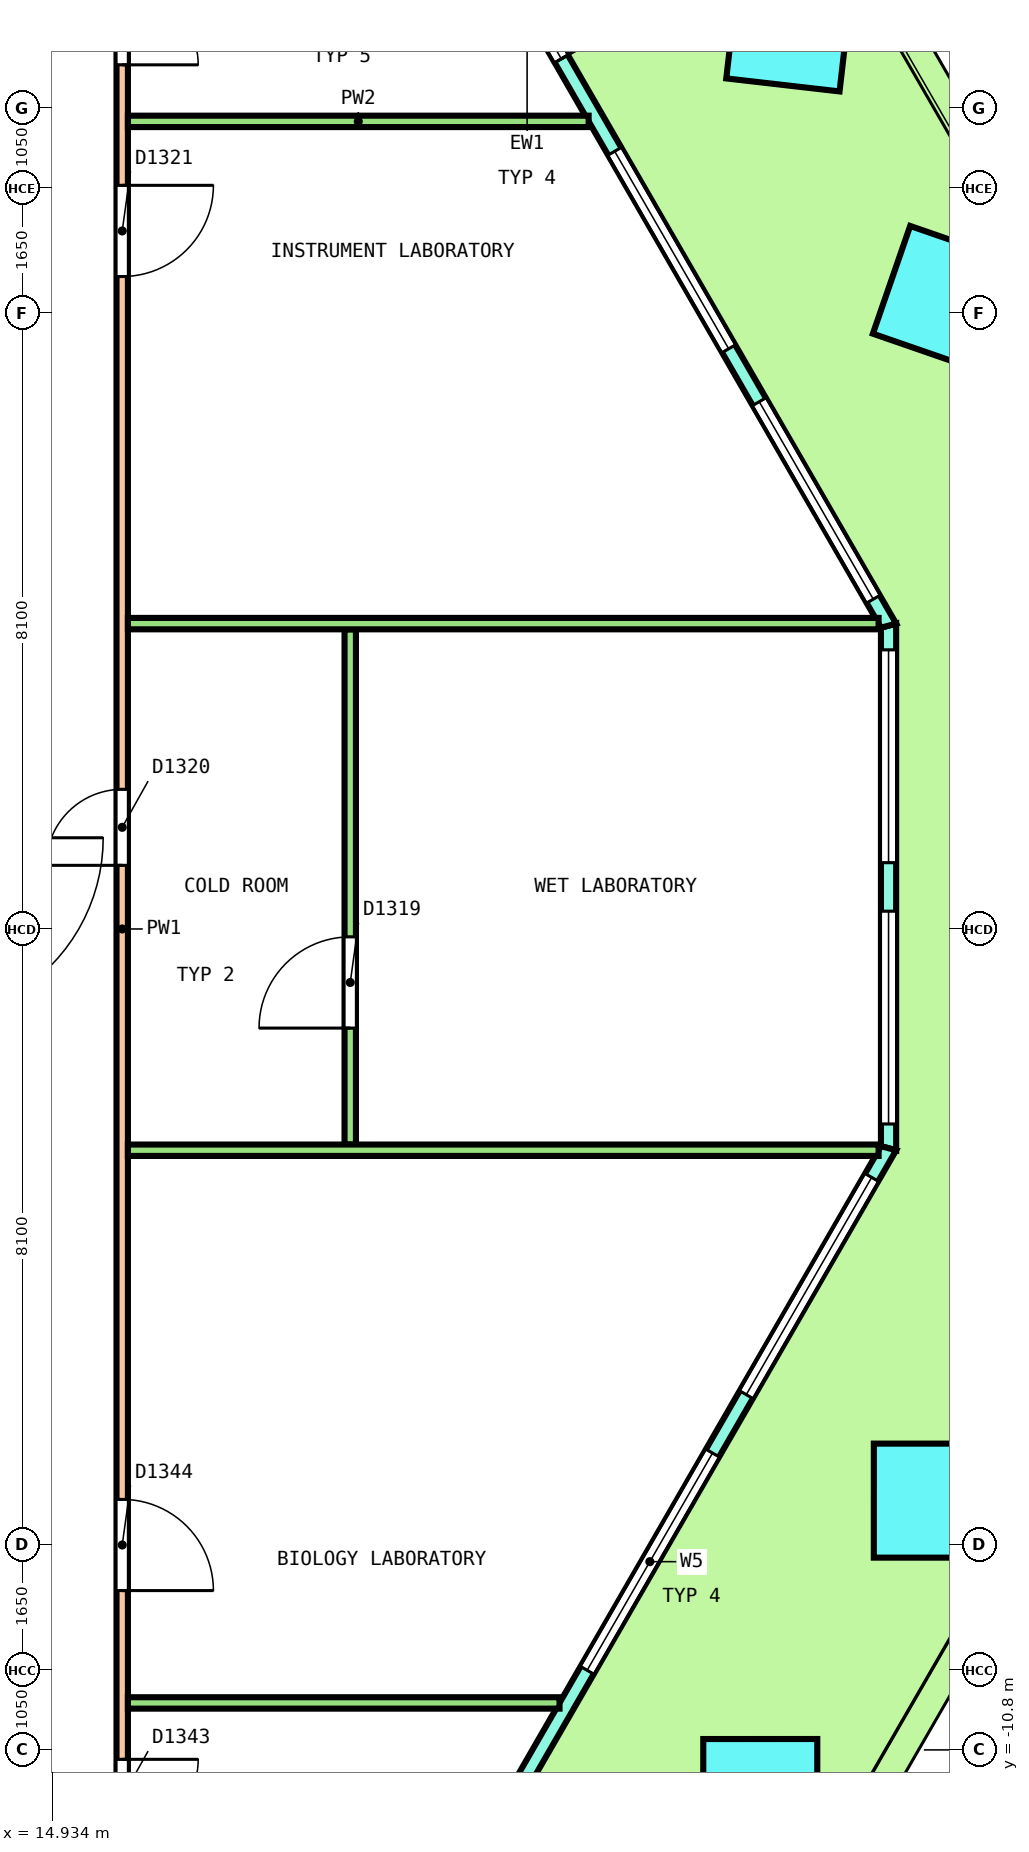
"""IFC4 building model, lengths in metres.
Left out: names, types, materials, properties, quantities, classifications, styles, units other than length and angle.
Written with IfcOpenShell. Run it as: python <this file> out.ifc"""

import sys

from ifc_helpers import new_model, si_unit, direction, frame, frame_2d, origin, origin_2d, place, context, subcontext, project, spatial, polyline, rectangle, outline, extrude, element, fill, save


model = new_model("IFC4")
c1 = context("Model", 3, precision=1e-05, world=origin(), true_north=direction((0.0, 1.0)))
c2 = subcontext(c1, "Body", "Model", "MODEL_VIEW")
j1 = project(units=[si_unit("LENGTHUNIT", "METRE"), si_unit("PLANEANGLEUNIT", "RADIAN")], contexts=[c1])
p1 = place(None, origin())
s1 = spatial("IfcSite", under=j1, at=p1, CompositionType="ELEMENT")
p2 = place(p1, origin())
s2 = spatial("IfcBuilding", under=s1, at=p2, CompositionType="ELEMENT")
p3 = place(p2, frame((0.0, 0.0, 32.2)))
s3 = spatial("IfcBuildingStorey", under=s2, at=p3, CompositionType="ELEMENT", Elevation=32.2)
p4 = place(p3, frame((26.68, 8.295, 0.0), z_axis=(0.021809609218, 0.025123223878, 0.999446429063), x_axis=(-0.499316957517, 0.86635106376, -0.010881647777)))
e1 = element("IfcColumn", 1, at=p4, inside=s3, PredefinedType="COLUMN", context=c2, shape_type="SweptSolid", body=[
    extrude(rectangle(XDim=1.5, YDim=1.5, at=origin_2d()), origin(), (0.0, 0.0, 1.0), 4.052),
])
p5 = place(p3, frame((24.628, 11.849, 0.0), z_axis=(0.025365582388, 0.018858497119, 0.999500347332), x_axis=(-0.501191337303, 0.865328971352, -0.0036075963)))
e2 = element("IfcColumn", 2, at=p5, inside=s3, PredefinedType="COLUMN", context=c2, shape_type="SweptSolid", body=[
    extrude(rectangle(XDim=1.5, YDim=1.5, at=origin_2d()), origin(), (0.0, 0.0, 1.0), 4.052),
])
p6 = place(p3, frame((24.245, -11.407, 0.0), z_axis=(0.003677036938, 0.006329325876, 0.999973209158), x_axis=(0.502147149997, 0.864751212075, -0.007319901948)))
e3 = element("IfcColumn", 3, at=p6, inside=s3, PredefinedType="COLUMN", context=c2, shape_type="SweptSolid", body=[
    extrude(rectangle(XDim=1.5, YDim=1.5, at=origin_2d()), origin(), (0.0, 0.0, 1.0), 4.05),
])
p7 = place(p3, frame((26.488, -7.521, 0.0), z_axis=(0.010908253887, 0.018863444567, 0.99976256204), x_axis=(0.500638377412, 0.865382225109, -0.021790354016)))
e4 = element("IfcColumn", 4, at=p7, inside=s3, PredefinedType="COLUMN", context=c2, shape_type="SweptSolid", body=[
    extrude(rectangle(XDim=1.5, YDim=1.5, at=origin_2d()), origin(), (0.0, 0.0, 1.0), 4.051),
])
p8 = place(p3, frame((25.932, -2.884, 0.0), z_axis=(0.0, 0.0, 1.0), x_axis=(0.0, 1.0, 0.0)))
e5 = element("IfcWall", 5, at=p8, inside=s3, PredefinedType="SOLIDWALL", context=c2, shape_type="SweptSolid", body=[
    extrude(outline(polyline([(-0.027, -0.1), (1.128, -0.1), (2.283, -0.1), (3.438, -0.1), (4.592, -0.1), (5.747, -0.1), (6.902, -0.1), (6.848, 0.1), (5.711, 0.1), (4.574, 0.1), (3.438, 0.1), (2.301, 0.1), (1.164, 0.1), (0.027, 0.1), (-0.027, -0.1)])), origin(), (0.0, 0.0, 1.0), 4.1),
])
p9 = place(p8, frame((0.319, 0.0, 0.1)))
e6 = element("IfcOpeningElement", 6, at=p9, cuts=e5, PredefinedType="OPENING", context=c2, shape_type="SweptSolid", body=[
    extrude(rectangle(XDim=2.8, YDim=2.9, at=frame_2d((1.4, 1.45))), frame((0.0, 0.11, 0.0), z_axis=(0.0, -1.0, 0.0), x_axis=(1.0, 0.0, 0.0)), (0.0, 0.0, 1.0), 0.22),
])
p10 = place(p8, frame((3.756, 0.0, 0.1)))
e7 = element("IfcOpeningElement", 7, at=p10, cuts=e5, PredefinedType="OPENING", context=c2, shape_type="SweptSolid", body=[
    extrude(rectangle(XDim=2.8, YDim=2.9, at=frame_2d((1.4, 1.45))), frame((0.0, 0.11, 0.0), z_axis=(0.0, -1.0, 0.0), x_axis=(1.0, 0.0, 0.0)), (0.0, 0.0, 1.0), 0.22),
])
p11 = place(p3, frame((25.932, 3.99, 0.0), z_axis=(0.0, 0.0, 1.0), x_axis=(-0.500001707189, 0.866024418136, 0.0)))
e8 = element("IfcWall", 8, at=p11, inside=s3, PredefinedType="SOLIDWALL", context=c2, shape_type="SweptSolid", body=[
    extrude(outline(polyline([(-0.027, -0.1), (0.977, -0.1), (1.981, -0.1), (2.985, -0.1), (3.989, -0.1), (4.993, -0.1), (5.997, -0.1), (7.0, -0.1), (8.004, -0.1), (9.008, -0.1), (10.012, -0.1), (11.016, -0.1), (12.02, -0.1), (13.024, -0.1), (14.028, -0.1), (15.032, -0.1), (16.036, -0.1), (17.04, -0.1), (18.043, -0.1), (19.047, -0.1), (18.994, 0.1), (17.995, 0.1), (16.997, 0.1), (15.999, 0.1), (15.001, 0.1), (14.002, 0.1), (13.004, 0.1), (12.006, 0.1), (11.008, 0.1), (10.009, 0.1), (9.011, 0.1), (8.013, 0.1), (7.015, 0.1), (6.016, 0.1), (5.018, 0.1), (4.02, 0.1), (3.022, 0.1), (2.023, 0.1), (1.025, 0.1), (0.027, 0.1), (-0.027, -0.1)])), origin(), (0.0, 0.0, 1.0), 4.1),
])
p12 = place(p11, frame((0.402, 0.0, 0.1)))
e9 = element("IfcOpeningElement", 9, at=p12, cuts=e8, PredefinedType="OPENING", context=c2, shape_type="SweptSolid", body=[
    extrude(rectangle(XDim=3.0, YDim=2.9, at=frame_2d((1.5, 1.45))), frame((0.0, 0.11, 0.0), z_axis=(0.0, -1.0, 0.0), x_axis=(1.0, 0.0, 0.0)), (0.0, 0.0, 1.0), 0.22),
])
p13 = place(p11, frame((4.206, 0.0, 0.1)))
e10 = element("IfcOpeningElement", 10, at=p13, cuts=e8, PredefinedType="OPENING", context=c2, shape_type="SweptSolid", body=[
    extrude(rectangle(XDim=3.0, YDim=2.9, at=frame_2d((1.5, 1.45))), frame((0.0, 0.11, 0.0), z_axis=(0.0, -1.0, 0.0), x_axis=(1.0, 0.0, 0.0)), (0.0, 0.0, 1.0), 0.22),
])
p14 = place(p11, frame((8.61, 0.0, 0.0)))
e11 = element("IfcOpeningElement", 11, at=p14, cuts=e8, PredefinedType="OPENING", context=c2, shape_type="SweptSolid", body=[
    extrude(rectangle(XDim=1.8, YDim=2.4, at=frame_2d((0.9, 1.2))), frame((0.0, 0.11, 0.0), z_axis=(0.0, -1.0, 0.0), x_axis=(1.0, 0.0, 0.0)), (0.0, 0.0, 1.0), 0.22),
])
p15 = place(p11, frame((8.61, 0.0, 2.55)))
e12 = element("IfcOpeningElement", 12, at=p15, cuts=e8, PredefinedType="OPENING", context=c2, shape_type="SweptSolid", body=[
    extrude(rectangle(XDim=1.8, YDim=0.45, at=frame_2d((0.9, 0.225))), frame((0.0, 0.11, 0.0), z_axis=(0.0, -1.0, 0.0), x_axis=(1.0, 0.0, 0.0)), (0.0, 0.0, 1.0), 0.22),
])
p16 = place(p11, frame((11.814, 0.0, 0.1)))
e13 = element("IfcOpeningElement", 13, at=p16, cuts=e8, PredefinedType="OPENING", context=c2, shape_type="SweptSolid", body=[
    extrude(rectangle(XDim=3.0, YDim=2.9, at=frame_2d((1.5, 1.45))), frame((0.0, 0.11, 0.0), z_axis=(0.0, -1.0, 0.0), x_axis=(1.0, 0.0, 0.0)), (0.0, 0.0, 1.0), 0.22),
])
p17 = place(p11, frame((15.618, 0.0, 0.1)))
e14 = element("IfcOpeningElement", 14, at=p17, cuts=e8, PredefinedType="OPENING", context=c2, shape_type="SweptSolid", body=[
    extrude(rectangle(XDim=3.0, YDim=2.9, at=frame_2d((1.5, 1.45))), frame((0.0, 0.11, 0.0), z_axis=(0.0, -1.0, 0.0), x_axis=(1.0, 0.0, 0.0)), (0.0, 0.0, 1.0), 0.22),
])
p18 = place(p3, frame((15.464, -21.016, 0.0), z_axis=(0.0, 0.0, 1.0), x_axis=(0.499999366442, 0.866025769569, 0.0)))
e15 = element("IfcWall", 15, at=p18, inside=s3, PredefinedType="SOLIDWALL", context=c2, shape_type="SweptSolid", body=[
    extrude(outline(polyline([(-0.027, -0.1), (1.023, -0.1), (2.072, -0.1), (3.122, -0.1), (4.171, -0.1), (5.221, -0.1), (6.27, -0.1), (7.32, -0.1), (8.369, -0.1), (9.419, -0.1), (10.468, -0.1), (11.518, -0.1), (12.567, -0.1), (13.617, -0.1), (14.666, -0.1), (15.716, -0.1), (16.765, -0.1), (17.815, -0.1), (18.864, -0.1), (19.914, -0.1), (20.963, -0.1), (20.91, 0.1), (19.865, 0.1), (18.821, 0.1), (17.777, 0.1), (16.733, 0.1), (15.689, 0.1), (14.645, 0.1), (13.601, 0.1), (12.557, 0.1), (11.512, 0.1), (10.468, 0.1), (9.424, 0.1), (8.38, 0.1), (7.336, 0.1), (6.292, 0.1), (5.248, 0.1), (4.203, 0.1), (3.159, 0.1), (2.115, 0.1), (1.071, 0.1), (0.027, 0.1), (-0.027, -0.1)])), origin(), (0.0, 0.0, 1.0), 4.1),
])
p19 = place(p18, frame((0.444, 0.0, 0.1)))
e16 = element("IfcOpeningElement", 16, at=p19, cuts=e15, PredefinedType="OPENING", context=c2, shape_type="SweptSolid", body=[
    extrude(rectangle(XDim=3.3, YDim=2.9, at=frame_2d((1.65, 1.45))), frame((0.0, 0.11, 0.0), z_axis=(0.0, -1.0, 0.0), x_axis=(1.0, 0.0, 0.0)), (0.0, 0.0, 1.0), 0.22),
])
p20 = place(p18, frame((4.631, 0.0, 0.1)))
e17 = element("IfcOpeningElement", 17, at=p20, cuts=e15, PredefinedType="OPENING", context=c2, shape_type="SweptSolid", body=[
    extrude(rectangle(XDim=3.3, YDim=2.9, at=frame_2d((1.65, 1.45))), frame((0.0, 0.11, 0.0), z_axis=(0.0, -1.0, 0.0), x_axis=(1.0, 0.0, 0.0)), (0.0, 0.0, 1.0), 0.22),
])
p21 = place(p18, frame((9.568, 0.0, 0.0)))
e18 = element("IfcOpeningElement", 18, at=p21, cuts=e15, PredefinedType="OPENING", context=c2, shape_type="SweptSolid", body=[
    extrude(rectangle(XDim=1.8, YDim=2.4, at=frame_2d((0.9, 1.2))), frame((0.0, 0.11, 0.0), z_axis=(0.0, -1.0, 0.0), x_axis=(1.0, 0.0, 0.0)), (0.0, 0.0, 1.0), 0.22),
])
p22 = place(p18, frame((9.568, 0.0, 2.55)))
e19 = element("IfcOpeningElement", 19, at=p22, cuts=e15, PredefinedType="OPENING", context=c2, shape_type="SweptSolid", body=[
    extrude(rectangle(XDim=1.8, YDim=0.45, at=frame_2d((0.9, 0.225))), frame((0.0, 0.11, 0.0), z_axis=(0.0, -1.0, 0.0), x_axis=(1.0, 0.0, 0.0)), (0.0, 0.0, 1.0), 0.22),
])
p23 = place(p18, frame((13.006, 0.0, 0.1)))
e20 = element("IfcOpeningElement", 20, at=p23, cuts=e15, PredefinedType="OPENING", context=c2, shape_type="SweptSolid", body=[
    extrude(rectangle(XDim=3.3, YDim=2.9, at=frame_2d((1.65, 1.45))), frame((0.0, 0.11, 0.0), z_axis=(0.0, -1.0, 0.0), x_axis=(1.0, 0.0, 0.0)), (0.0, 0.0, 1.0), 0.22),
])
p24 = place(p18, frame((17.193, 0.0, 0.1)))
e21 = element("IfcOpeningElement", 21, at=p24, cuts=e15, PredefinedType="OPENING", context=c2, shape_type="SweptSolid", body=[
    extrude(rectangle(XDim=3.3, YDim=2.9, at=frame_2d((1.65, 1.45))), frame((0.0, 0.11, 0.0), z_axis=(0.0, -1.0, 0.0), x_axis=(1.0, 0.0, 0.0)), (0.0, 0.0, 1.0), 0.22),
])
p25 = place(p3, frame((15.85, -13.375, 0.0), z_axis=(0.0, 0.0, 1.0), x_axis=(0.0, 1.0, 0.0)))
e22 = element("IfcWall", 22, at=p25, inside=s3, PredefinedType="PARTITIONING", context=c2, shape_type="SweptSolid", body=[
    extrude(rectangle(XDim=26.75, YDim=0.15, at=frame_2d((13.375, 0.0))), origin(), (0.0, 0.0, 1.0), 3.05),
])
p26 = place(p25, frame((14.212, 0.0, 0.0)))
e23 = element("IfcOpeningElement", 23, at=p26, cuts=e22, PredefinedType="OPENING", context=c2, shape_type="SweptSolid", body=[
    extrude(rectangle(XDim=1.0, YDim=2.1, at=frame_2d((0.5, 1.05))), frame((0.0, 0.085, 0.0), z_axis=(0.0, -1.0, 0.0), x_axis=(1.0, 0.0, 0.0)), (0.0, 0.0, 1.0), 0.17),
])
p27 = place(p25, frame((21.958, 0.0, 0.0)))
e24 = element("IfcOpeningElement", 24, at=p27, cuts=e22, PredefinedType="OPENING", context=c2, shape_type="SweptSolid", body=[
    extrude(rectangle(XDim=1.2, YDim=2.1, at=frame_2d((0.6, 1.05))), frame((0.0, 0.085, 0.0), z_axis=(0.0, -1.0, 0.0), x_axis=(1.0, 0.0, 0.0)), (0.0, 0.0, 1.0), 0.17),
])
p28 = place(p25, frame((24.743, 0.0, 0.0)))
e25 = element("IfcOpeningElement", 25, at=p28, cuts=e22, PredefinedType="OPENING", context=c2, shape_type="SweptSolid", body=[
    extrude(rectangle(XDim=1.0, YDim=2.1, at=frame_2d((0.5, 1.05))), frame((0.0, 0.085, 0.0), z_axis=(0.0, -1.0, 0.0), x_axis=(1.0, 0.0, 0.0)), (0.0, 0.0, 1.0), 0.17),
])
p29 = place(p25, frame((1.451, 0.0, 0.0)))
e26 = element("IfcOpeningElement", 26, at=p29, cuts=e22, PredefinedType="OPENING", context=c2, shape_type="SweptSolid", body=[
    extrude(rectangle(XDim=1.0, YDim=2.1, at=frame_2d((0.5, 1.05))), frame((0.0, 0.085, 0.0), z_axis=(0.0, -1.0, 0.0), x_axis=(1.0, 0.0, 0.0)), (0.0, 0.0, 1.0), 0.17),
])
p30 = place(p25, frame((4.671, 0.0, 0.0)))
e27 = element("IfcOpeningElement", 27, at=p30, cuts=e22, PredefinedType="OPENING", context=c2, shape_type="SweptSolid", body=[
    extrude(rectangle(XDim=1.2, YDim=2.1, at=frame_2d((0.6, 1.05))), frame((0.0, 0.085, 0.0), z_axis=(0.0, -1.0, 0.0), x_axis=(1.0, 0.0, 0.0)), (0.0, 0.0, 1.0), 0.17),
])
p31 = place(p3, frame((18.85, -2.836, 0.0), z_axis=(0.0, 0.0, 1.0), x_axis=(0.0, 1.0, 0.0)))
e28 = element("IfcWall", 28, at=p31, inside=s3, PredefinedType="PARTITIONING", context=c2, shape_type="SweptSolid", body=[
    extrude(rectangle(XDim=6.778, YDim=0.15, at=frame_2d((3.389, 0.0))), origin(), (0.0, 0.0, 1.0), 3.05),
])
p32 = place(p31, frame((1.532, 0.0, 0.0)))
e29 = element("IfcOpeningElement", 29, at=p32, cuts=e28, PredefinedType="OPENING", context=c2, shape_type="SweptSolid", body=[
    extrude(rectangle(XDim=1.2, YDim=2.1, at=frame_2d((0.6, 1.05))), frame((0.0, 0.085, 0.0), z_axis=(0.0, -1.0, 0.0), x_axis=(1.0, 0.0, 0.0)), (0.0, 0.0, 1.0), 0.17),
])
for number, where, z_axis, x_axis in (
    (30, (15.925, 4.017, 0.0), (0.0, 0.0, 1.0), (1.0, 0.0, 0.0)),
    (31, (15.925, -2.911, 0.0), (0.0, 0.0, 1.0), (1.0, 0.0, 0.0)),
):
    element("IfcWall", number, at=place(p3, frame(where, z_axis=z_axis, x_axis=x_axis)), inside=s3, PredefinedType="PARTITIONING", context=c2, shape_type="SweptSolid", body=[
        extrude(rectangle(XDim=9.876, YDim=0.15, at=frame_2d((4.938, 0.0))), origin(), (0.0, 0.0, 1.0), 3.05),
    ])
p33 = place(p3, frame((15.925, 10.625, 0.0), z_axis=(0.0, 0.0, 1.0), x_axis=(1.0, 0.0, 0.0)))
e32 = element("IfcWall", 32, at=p33, inside=s3, PredefinedType="PARTITIONING", context=c2, shape_type="SweptSolid", body=[
    extrude(rectangle(XDim=6.061, YDim=0.15, at=frame_2d((3.031, 0.0))), origin(), (0.0, 0.0, 1.0), 3.05),
])
p34 = place(p3, frame((15.925, -10.182, 0.0), z_axis=(0.0, 0.0, 1.0), x_axis=(1.0, 0.0, 0.0)))
e33 = element("IfcWall", 33, at=p34, inside=s3, PredefinedType="PARTITIONING", context=c2, shape_type="SweptSolid", body=[
    extrude(rectangle(XDim=5.678, YDim=0.15, at=frame_2d((2.839, 0.0))), origin(), (0.0, 0.0, 1.0), 3.05),
])
p35 = place(p9, origin())
e34 = element("IfcWindow", 34, at=p35, inside=s3, PartitioningType="SINGLE_PANEL", PredefinedType="WINDOW", context=c2, shape_type="SweptSolid", body=[
    extrude(rectangle(XDim=2.8, YDim=2.9, at=frame_2d((1.4, 1.45))), frame((0.0, 0.03, 0.0), z_axis=(0.0, -1.0, 0.0), x_axis=(1.0, 0.0, 0.0)), (0.0, 0.0, 1.0), 0.06),
])
fill(e6, e34)
p36 = place(p10, origin())
e35 = element("IfcWindow", 35, at=p36, inside=s3, PartitioningType="SINGLE_PANEL", PredefinedType="WINDOW", context=c2, shape_type="SweptSolid", body=[
    extrude(rectangle(XDim=2.8, YDim=2.9, at=frame_2d((1.4, 1.45))), frame((0.0, 0.03, 0.0), z_axis=(0.0, -1.0, 0.0), x_axis=(1.0, 0.0, 0.0)), (0.0, 0.0, 1.0), 0.06),
])
fill(e7, e35)
p37 = place(p12, origin())
e36 = element("IfcWindow", 36, at=p37, inside=s3, PartitioningType="SINGLE_PANEL", PredefinedType="WINDOW", context=c2, shape_type="SweptSolid", body=[
    extrude(rectangle(XDim=3.0, YDim=2.9, at=frame_2d((1.5, 1.45))), frame((0.0, 0.03, 0.0), z_axis=(0.0, -1.0, 0.0), x_axis=(1.0, 0.0, 0.0)), (0.0, 0.0, 1.0), 0.06),
])
fill(e9, e36)
p38 = place(p13, origin())
e37 = element("IfcWindow", 37, at=p38, inside=s3, PartitioningType="SINGLE_PANEL", PredefinedType="WINDOW", context=c2, shape_type="SweptSolid", body=[
    extrude(rectangle(XDim=3.0, YDim=2.9, at=frame_2d((1.5, 1.45))), frame((0.0, 0.03, 0.0), z_axis=(0.0, -1.0, 0.0), x_axis=(1.0, 0.0, 0.0)), (0.0, 0.0, 1.0), 0.06),
])
fill(e10, e37)
p39 = place(p14, origin())
e38 = element("IfcDoor", 38, at=p39, inside=s3, OperationType="DOUBLE_DOOR_SINGLE_SWING", PredefinedType="DOOR", context=c2, shape_type="SweptSolid", body=[
    extrude(rectangle(XDim=1.8, YDim=2.4, at=frame_2d((0.9, 1.2))), frame((0.0, 0.025, 0.0), z_axis=(0.0, -1.0, 0.0), x_axis=(1.0, 0.0, 0.0)), (0.0, 0.0, 1.0), 0.05),
])
fill(e11, e38)
p40 = place(p15, origin())
e39 = element("IfcWindow", 39, at=p40, inside=s3, PartitioningType="SINGLE_PANEL", PredefinedType="WINDOW", context=c2, shape_type="SweptSolid", body=[
    extrude(rectangle(XDim=1.8, YDim=0.45, at=frame_2d((0.9, 0.225))), frame((0.0, 0.03, 0.0), z_axis=(0.0, -1.0, 0.0), x_axis=(1.0, 0.0, 0.0)), (0.0, 0.0, 1.0), 0.06),
])
fill(e12, e39)
p41 = place(p23, origin())
e40 = element("IfcWindow", 40, at=p41, inside=s3, PartitioningType="SINGLE_PANEL", PredefinedType="WINDOW", context=c2, shape_type="SweptSolid", body=[
    extrude(rectangle(XDim=3.3, YDim=2.9, at=frame_2d((1.65, 1.45))), frame((0.0, 0.03, 0.0), z_axis=(0.0, -1.0, 0.0), x_axis=(1.0, 0.0, 0.0)), (0.0, 0.0, 1.0), 0.06),
])
fill(e20, e40)
p42 = place(p24, origin())
e41 = element("IfcWindow", 41, at=p42, inside=s3, PartitioningType="SINGLE_PANEL", PredefinedType="WINDOW", context=c2, shape_type="SweptSolid", body=[
    extrude(rectangle(XDim=3.3, YDim=2.9, at=frame_2d((1.65, 1.45))), frame((0.0, 0.03, 0.0), z_axis=(0.0, -1.0, 0.0), x_axis=(1.0, 0.0, 0.0)), (0.0, 0.0, 1.0), 0.06),
])
fill(e21, e41)
p43 = place(p32, origin())
e42 = element("IfcDoor", 42, at=p43, inside=s3, OperationType="DOUBLE_DOOR_SINGLE_SWING", PredefinedType="DOOR", context=c2, shape_type="SweptSolid", body=[
    extrude(rectangle(XDim=1.2, YDim=2.1, at=frame_2d((0.6, 1.05))), frame((0.0, 0.025, 0.0), z_axis=(0.0, -1.0, 0.0), x_axis=(1.0, 0.0, 0.0)), (0.0, 0.0, 1.0), 0.05),
])
fill(e29, e42)
p44 = place(p26, origin())
e43 = element("IfcDoor", 43, at=p44, inside=s3, OperationType="SINGLE_SWING_RIGHT", PredefinedType="DOOR", context=c2, shape_type="SweptSolid", body=[
    extrude(rectangle(XDim=1.0, YDim=2.1, at=frame_2d((0.5, 1.05))), frame((0.0, 0.025, 0.0), z_axis=(0.0, -1.0, 0.0), x_axis=(1.0, 0.0, 0.0)), (0.0, 0.0, 1.0), 0.05),
])
fill(e23, e43)
p45 = place(p27, origin())
e44 = element("IfcDoor", 44, at=p45, inside=s3, OperationType="DOUBLE_DOOR_SINGLE_SWING", PredefinedType="DOOR", context=c2, shape_type="SweptSolid", body=[
    extrude(rectangle(XDim=1.2, YDim=2.1, at=frame_2d((0.6, 1.05))), frame((0.0, 0.025, 0.0), z_axis=(0.0, -1.0, 0.0), x_axis=(1.0, 0.0, 0.0)), (0.0, 0.0, 1.0), 0.05),
])
fill(e24, e44)
p46 = place(p28, origin())
e45 = element("IfcDoor", 45, at=p46, inside=s3, OperationType="SINGLE_SWING_LEFT", PredefinedType="DOOR", context=c2, shape_type="SweptSolid", body=[
    extrude(rectangle(XDim=1.0, YDim=2.1, at=frame_2d((0.5, 1.05))), frame((0.0, 0.025, 0.0), z_axis=(0.0, -1.0, 0.0), x_axis=(1.0, 0.0, 0.0)), (0.0, 0.0, 1.0), 0.05),
])
fill(e25, e45)
p47 = place(p29, origin())
e46 = element("IfcDoor", 46, at=p47, inside=s3, OperationType="SINGLE_SWING_RIGHT", PredefinedType="DOOR", context=c2, shape_type="SweptSolid", body=[
    extrude(rectangle(XDim=1.0, YDim=2.1, at=frame_2d((0.5, 1.05))), frame((0.0, 0.025, 0.0), z_axis=(0.0, -1.0, 0.0), x_axis=(1.0, 0.0, 0.0)), (0.0, 0.0, 1.0), 0.05),
])
fill(e26, e46)
p48 = place(p30, origin())
e47 = element("IfcDoor", 47, at=p48, inside=s3, OperationType="DOUBLE_DOOR_SINGLE_SWING", PredefinedType="DOOR", context=c2, shape_type="SweptSolid", body=[
    extrude(rectangle(XDim=1.2, YDim=2.1, at=frame_2d((0.6, 1.05))), frame((0.0, 0.025, 0.0), z_axis=(0.0, -1.0, 0.0), x_axis=(1.0, 0.0, 0.0)), (0.0, 0.0, 1.0), 0.05),
])
fill(e27, e47)
save(model, sys.argv[1])
